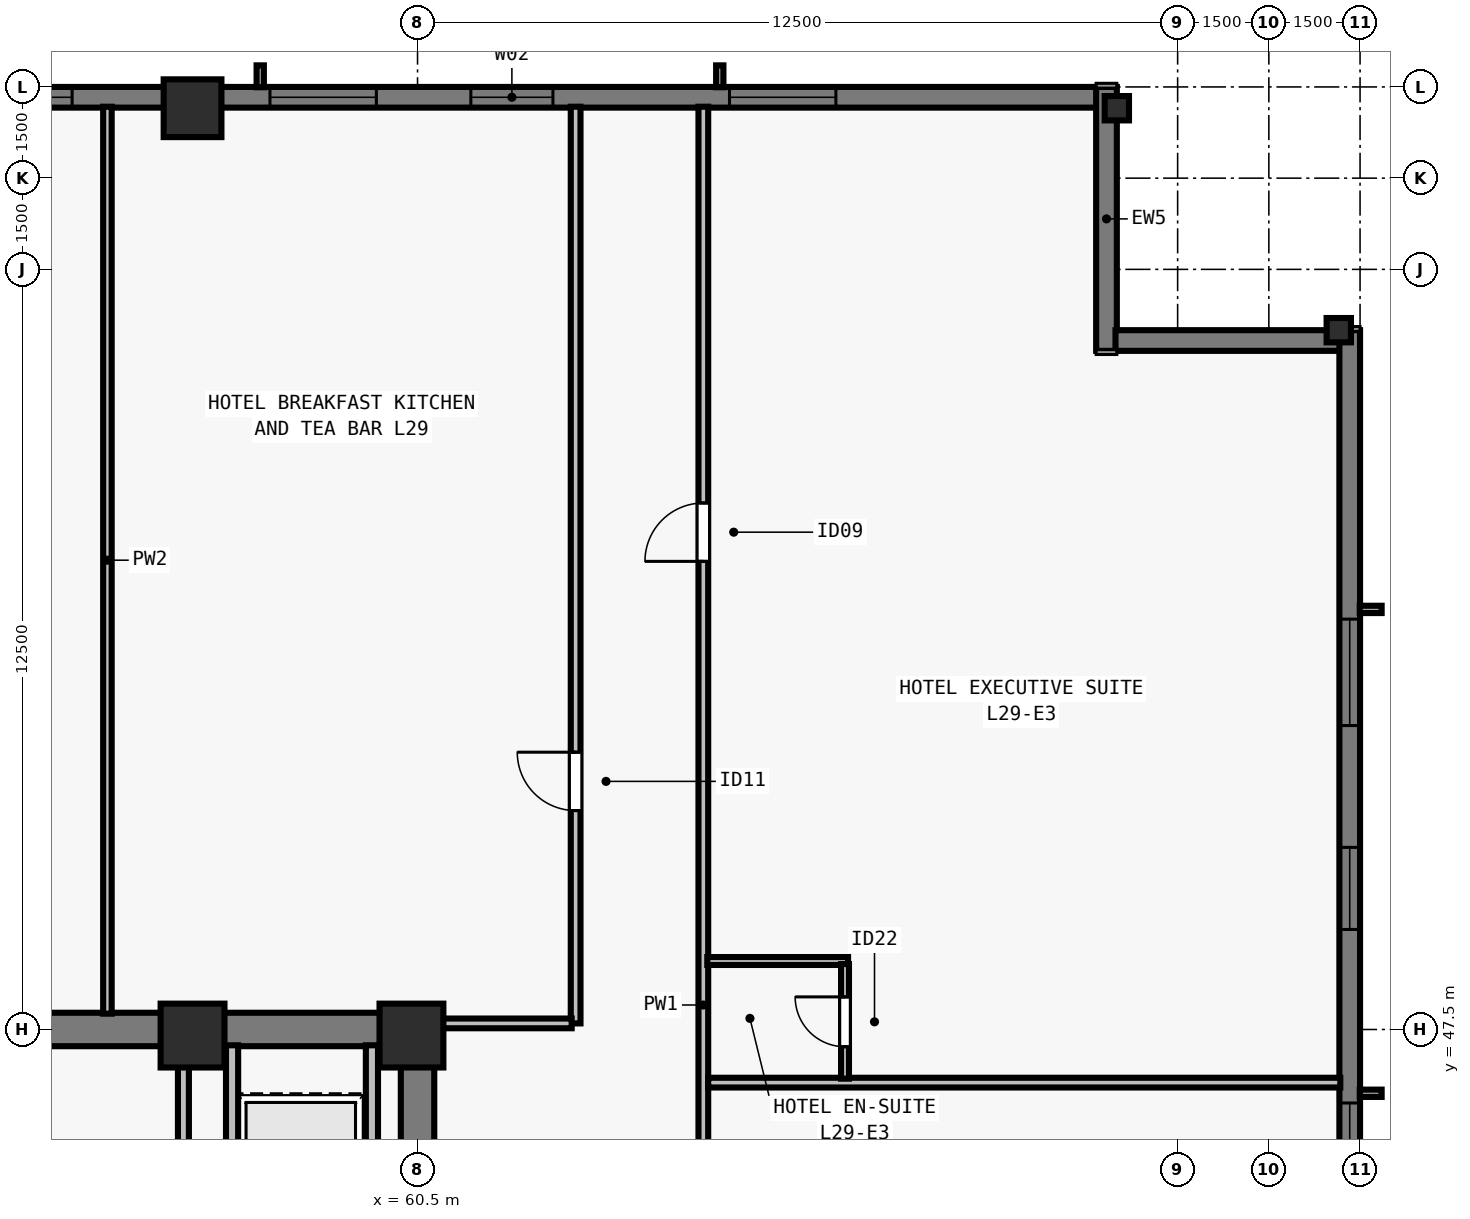
"""IFC4 building model, lengths in metres.
Left out: names, types, materials, properties, quantities, classifications, styles, units other than length and angle.
Written with IfcOpenShell. Run it as: python <this file> out.ifc"""

import sys

from ifc_helpers import new_model, si_unit, direction, frame, frame_2d, origin, origin_2d, place, context, subcontext, project, spatial, rectangle, i_section, extrude, element, fill, save


model = new_model("IFC4")
c1 = context("Model", 3, precision=1e-05, world=origin(), true_north=direction((0.0, 1.0)))
c2 = subcontext(c1, "Body", "Model", "MODEL_VIEW")
j1 = project(units=[si_unit("LENGTHUNIT", "METRE"), si_unit("PLANEANGLEUNIT", "RADIAN")], contexts=[c1])
p1 = place(None, origin())
s1 = spatial("IfcSite", under=j1, at=p1, CompositionType="ELEMENT")
p2 = place(p1, origin())
s2 = spatial("IfcBuilding", under=s1, at=p2, CompositionType="ELEMENT")
p3 = place(p2, frame((0.0, 0.0, 109.5)))
s3 = spatial("IfcBuildingStorey", under=s2, at=p3, CompositionType="ELEMENT", Elevation=109.5)
for number, where, z_axis, x_axis in (
    (1, (56.8, 47.4, 0.0), (0.0, 0.0, 1.0), (1.0, 0.0, 0.0)),
    (2, (60.4, 47.4, 0.0), (0.0, 0.0, 1.0), (1.0, 0.0, 0.0)),
):
    element("IfcColumn", number, at=place(p3, frame(where, z_axis=z_axis, x_axis=x_axis)), inside=s3, PredefinedType="COLUMN", context=c2, shape_type="SweptSolid", body=[
        extrude(rectangle(XDim=1.05, YDim=1.05, at=origin_2d()), origin(), (0.0, 0.0, 1.0), 3.5),
    ])
for number, where, z_axis, x_axis in (
    (3, (75.65, 59.0, 0.0), (0.0, 0.0, 1.0), (0.0, 1.0, 0.0)),
    (4, (72.0, 62.65, 0.0), (0.0, 0.0, 1.0), (1.0, 0.0, 0.0)),
):
    element("IfcColumn", number, at=place(p3, frame(where, z_axis=z_axis, x_axis=x_axis)), inside=s3, PredefinedType="COLUMN", context=c2, shape_type="SweptSolid", body=[
        extrude(i_section(OverallWidth=0.4, OverallDepth=0.4, WebThickness=0.022, FlangeThickness=0.036, at=origin_2d()), origin(), (0.0, 0.0, 1.0), 3.5),
    ])
p4 = place(p3, frame((56.8, 62.65, 0.0), z_axis=(0.0, 0.0, 1.0), x_axis=(1.0, 0.0, 0.0)))
e5 = element("IfcColumn", 5, at=p4, inside=s3, PredefinedType="COLUMN", context=c2, shape_type="SweptSolid", body=[
    extrude(rectangle(XDim=0.95, YDim=0.95, at=origin_2d()), origin(), (0.0, 0.0, 1.0), 3.5),
])
p5 = place(p3, frame((32.0, 62.83, 0.0), z_axis=(0.0, 0.0, 1.0), x_axis=(1.0, 0.0, 0.0)))
e6 = element("IfcWall", 6, at=p5, inside=s3, PredefinedType="SOLIDWALL", context=c2, shape_type="SweptSolid", body=[
    extrude(rectangle(XDim=39.682, YDim=0.34, at=frame_2d((19.841, 0.0))), origin(), (0.0, 0.0, 1.0), 3.28),
])
p6 = place(p5, frame((4.302, 0.0, 0.8)))
e7 = element("IfcOpeningElement", 7, at=p6, cuts=e6, PredefinedType="OPENING", context=c2, shape_type="SweptSolid", body=[
    extrude(rectangle(XDim=1.75, YDim=1.66, at=frame_2d((0.875, 0.83))), frame((0.0, 0.18, 0.0), z_axis=(0.0, -1.0, 0.0), x_axis=(1.0, 0.0, 0.0)), (0.0, 0.0, 1.0), 0.36),
])
p7 = place(p5, frame((9.355, 0.0, 0.8)))
e8 = element("IfcOpeningElement", 8, at=p7, cuts=e6, PredefinedType="OPENING", context=c2, shape_type="SweptSolid", body=[
    extrude(rectangle(XDim=1.35, YDim=1.66, at=frame_2d((0.675, 0.83))), frame((0.0, 0.18, 0.0), z_axis=(0.0, -1.0, 0.0), x_axis=(1.0, 0.0, 0.0)), (0.0, 0.0, 1.0), 0.36),
])
p8 = place(p5, frame((11.859, 0.0, 0.8)))
e9 = element("IfcOpeningElement", 9, at=p8, cuts=e6, PredefinedType="OPENING", context=c2, shape_type="SweptSolid", body=[
    extrude(rectangle(XDim=1.75, YDim=1.66, at=frame_2d((0.875, 0.83))), frame((0.0, 0.18, 0.0), z_axis=(0.0, -1.0, 0.0), x_axis=(1.0, 0.0, 0.0)), (0.0, 0.0, 1.0), 0.36),
])
p9 = place(p5, frame((18.966, 0.0, 0.8)))
e10 = element("IfcOpeningElement", 10, at=p9, cuts=e6, PredefinedType="OPENING", context=c2, shape_type="SweptSolid", body=[
    extrude(rectangle(XDim=1.75, YDim=1.66, at=frame_2d((0.875, 0.83))), frame((0.0, 0.18, 0.0), z_axis=(0.0, -1.0, 0.0), x_axis=(1.0, 0.0, 0.0)), (0.0, 0.0, 1.0), 0.36),
])
p10 = place(p5, frame((21.469, 0.0, 0.8)))
e11 = element("IfcOpeningElement", 11, at=p10, cuts=e6, PredefinedType="OPENING", context=c2, shape_type="SweptSolid", body=[
    extrude(rectangle(XDim=1.35, YDim=1.66, at=frame_2d((0.675, 0.83))), frame((0.0, 0.18, 0.0), z_axis=(0.0, -1.0, 0.0), x_axis=(1.0, 0.0, 0.0)), (0.0, 0.0, 1.0), 0.36),
])
p11 = place(p5, frame((26.073, 0.0, 0.8)))
e12 = element("IfcOpeningElement", 12, at=p11, cuts=e6, PredefinedType="OPENING", context=c2, shape_type="SweptSolid", body=[
    extrude(rectangle(XDim=1.75, YDim=1.66, at=frame_2d((0.875, 0.83))), frame((0.0, 0.18, 0.0), z_axis=(0.0, -1.0, 0.0), x_axis=(1.0, 0.0, 0.0)), (0.0, 0.0, 1.0), 0.36),
])
p12 = place(p5, frame((29.377, 0.0, 0.8)))
e13 = element("IfcOpeningElement", 13, at=p12, cuts=e6, PredefinedType="OPENING", context=c2, shape_type="SweptSolid", body=[
    extrude(rectangle(XDim=1.35, YDim=1.66, at=frame_2d((0.675, 0.83))), frame((0.0, 0.18, 0.0), z_axis=(0.0, -1.0, 0.0), x_axis=(1.0, 0.0, 0.0)), (0.0, 0.0, 1.0), 0.36),
])
p13 = place(p5, frame((33.63, 0.0, 0.8)))
e14 = element("IfcOpeningElement", 14, at=p13, cuts=e6, PredefinedType="OPENING", context=c2, shape_type="SweptSolid", body=[
    extrude(rectangle(XDim=1.75, YDim=1.66, at=frame_2d((0.875, 0.83))), frame((0.0, 0.18, 0.0), z_axis=(0.0, -1.0, 0.0), x_axis=(1.0, 0.0, 0.0)), (0.0, 0.0, 1.0), 0.36),
])
p14 = place(p3, frame((71.83, 63.0, 0.0), z_axis=(0.0, 0.0, 1.0), x_axis=(0.0, -1.0, 0.0)))
e15 = element("IfcWall", 15, at=p14, inside=s3, PredefinedType="SOLIDWALL", context=c2, shape_type="SweptSolid", body=[
    extrude(rectangle(XDim=4.34, YDim=0.34, at=frame_2d((2.17, 0.0))), origin(), (0.0, 0.0, 1.0), 3.28),
])
p15 = place(p3, frame((71.978, 58.83, 0.0), z_axis=(0.0, 0.0, 1.0), x_axis=(1.0, 0.0, 0.0)))
e16 = element("IfcWall", 16, at=p15, inside=s3, PredefinedType="SOLIDWALL", context=c2, shape_type="SweptSolid", body=[
    extrude(rectangle(XDim=3.704, YDim=0.34, at=frame_2d((1.852, 0.0))), origin(), (0.0, 0.0, 1.0), 3.28),
])
p16 = place(p3, frame((75.83, 59.0, 0.0), z_axis=(0.0, 0.0, 1.0), x_axis=(0.0, -1.0, 0.0)))
e17 = element("IfcWall", 17, at=p16, inside=s3, PredefinedType="SOLIDWALL", context=c2, shape_type="SweptSolid", body=[
    extrude(rectangle(XDim=39.682, YDim=0.34, at=frame_2d((19.841, 0.0))), origin(), (0.0, 0.0, 1.0), 3.28),
])
p17 = place(p16, frame((4.752, 0.0, 0.8)))
e18 = element("IfcOpeningElement", 18, at=p17, cuts=e17, PredefinedType="OPENING", context=c2, shape_type="SweptSolid", body=[
    extrude(rectangle(XDim=1.75, YDim=1.66, at=frame_2d((0.875, 0.83))), frame((0.0, 0.18, 0.0), z_axis=(0.0, -1.0, 0.0), x_axis=(1.0, 0.0, 0.0)), (0.0, 0.0, 1.0), 0.36),
])
p18 = place(p16, frame((8.505, 0.0, 0.8)))
e19 = element("IfcOpeningElement", 19, at=p18, cuts=e17, PredefinedType="OPENING", context=c2, shape_type="SweptSolid", body=[
    extrude(rectangle(XDim=1.35, YDim=1.66, at=frame_2d((0.675, 0.83))), frame((0.0, 0.18, 0.0), z_axis=(0.0, -1.0, 0.0), x_axis=(1.0, 0.0, 0.0)), (0.0, 0.0, 1.0), 0.36),
])
p19 = place(p16, frame((12.709, 0.0, 0.8)))
e20 = element("IfcOpeningElement", 20, at=p19, cuts=e17, PredefinedType="OPENING", context=c2, shape_type="SweptSolid", body=[
    extrude(rectangle(XDim=1.75, YDim=1.66, at=frame_2d((0.875, 0.83))), frame((0.0, 0.18, 0.0), z_axis=(0.0, -1.0, 0.0), x_axis=(1.0, 0.0, 0.0)), (0.0, 0.0, 1.0), 0.36),
])
p20 = place(p16, frame((16.062, 0.0, 0.8)))
e21 = element("IfcOpeningElement", 21, at=p20, cuts=e17, PredefinedType="OPENING", context=c2, shape_type="SweptSolid", body=[
    extrude(rectangle(XDim=1.35, YDim=1.66, at=frame_2d((0.675, 0.83))), frame((0.0, 0.18, 0.0), z_axis=(0.0, -1.0, 0.0), x_axis=(1.0, 0.0, 0.0)), (0.0, 0.0, 1.0), 0.36),
])
p21 = place(p16, frame((18.966, 0.0, 0.8)))
e22 = element("IfcOpeningElement", 22, at=p21, cuts=e17, PredefinedType="OPENING", context=c2, shape_type="SweptSolid", body=[
    extrude(rectangle(XDim=1.75, YDim=1.66, at=frame_2d((0.875, 0.83))), frame((0.0, 0.18, 0.0), z_axis=(0.0, -1.0, 0.0), x_axis=(1.0, 0.0, 0.0)), (0.0, 0.0, 1.0), 0.36),
])
p22 = place(p16, frame((22.719, 0.0, 0.8)))
e23 = element("IfcOpeningElement", 23, at=p22, cuts=e17, PredefinedType="OPENING", context=c2, shape_type="SweptSolid", body=[
    extrude(rectangle(XDim=1.35, YDim=1.66, at=frame_2d((0.675, 0.83))), frame((0.0, 0.18, 0.0), z_axis=(0.0, -1.0, 0.0), x_axis=(1.0, 0.0, 0.0)), (0.0, 0.0, 1.0), 0.36),
])
p23 = place(p16, frame((29.827, 0.0, 0.8)))
e24 = element("IfcOpeningElement", 24, at=p23, cuts=e17, PredefinedType="OPENING", context=c2, shape_type="SweptSolid", body=[
    extrude(rectangle(XDim=1.35, YDim=1.66, at=frame_2d((0.675, 0.83))), frame((0.0, 0.18, 0.0), z_axis=(0.0, -1.0, 0.0), x_axis=(1.0, 0.0, 0.0)), (0.0, 0.0, 1.0), 0.36),
])
p24 = place(p16, frame((33.18, 0.0, 0.8)))
e25 = element("IfcOpeningElement", 25, at=p24, cuts=e17, PredefinedType="OPENING", context=c2, shape_type="SweptSolid", body=[
    extrude(rectangle(XDim=1.75, YDim=1.66, at=frame_2d((0.875, 0.83))), frame((0.0, 0.18, 0.0), z_axis=(0.0, -1.0, 0.0), x_axis=(1.0, 0.0, 0.0)), (0.0, 0.0, 1.0), 0.36),
])
p25 = place(p3, frame((43.225, 47.5, 0.0), z_axis=(0.0, 0.0, 1.0), x_axis=(1.0, 0.0, 0.0)))
e26 = element("IfcWall", 26, at=p25, inside=s3, PredefinedType="SHEAR", context=c2, shape_type="SweptSolid", body=[
    extrude(rectangle(XDim=17.55, YDim=0.55, at=frame_2d((8.775, 0.0))), origin(), (0.0, 0.0, 1.0), 3.28),
])
p26 = place(p3, frame((60.5, 40.8, 0.0), z_axis=(0.0, 0.0, 1.0), x_axis=(0.0, 1.0, 0.0)))
e27 = element("IfcWall", 27, at=p26, inside=s3, PredefinedType="SHEAR", context=c2, shape_type="SweptSolid", body=[
    extrude(rectangle(XDim=6.435, YDim=0.55, at=frame_2d((3.218, 0.0))), origin(), (0.0, 0.0, 1.0), 3.28),
])
for number, where, z_axis, x_axis in (
    (28, (57.45, 43.735, 0.0), (0.0, 0.0, 1.0), (0.0, 1.0, 0.0)),
    (29, (59.75, 43.735, 0.0), (0.0, 0.0, 1.0), (0.0, 1.0, 0.0)),
):
    element("IfcWall", number, at=place(p3, frame(where, z_axis=z_axis, x_axis=x_axis)), inside=s3, PredefinedType="SOLIDWALL", context=c2, shape_type="SweptSolid", body=[
        extrude(rectangle(XDim=3.505, YDim=0.2, at=frame_2d((1.752, 0.0))), origin(), (0.0, 0.0, 1.0), 3.28),
    ])
p27 = place(p3, frame((56.65, 43.735, 0.0), z_axis=(0.0, 0.0, 1.0), x_axis=(0.0, 1.0, 0.0)))
e30 = element("IfcWall", 30, at=p27, inside=s3, PredefinedType="SOLIDWALL", context=c2, shape_type="SweptSolid", body=[
    extrude(rectangle(XDim=3.505, YDim=0.18, at=frame_2d((1.752, 0.0))), origin(), (0.0, 0.0, 1.0), 3.28),
])
p28 = place(p3, frame((65.2, 15.325, 0.0), z_axis=(0.0, 0.0, 1.0), x_axis=(0.0, 1.0, 0.0)))
e31 = element("IfcWall", 31, at=p28, inside=s3, PredefinedType="PARTITIONING", context=c2, shape_type="SweptSolid", body=[
    extrude(rectangle(XDim=47.35, YDim=0.16, at=frame_2d((23.675, 0.0))), origin(), (0.0, 0.0, 1.0), 2.555),
])
p29 = place(p28, frame((8.944, 0.0, 0.0)))
e32 = element("IfcOpeningElement", 32, at=p29, cuts=e31, PredefinedType="OPENING", context=c2, shape_type="SweptSolid", body=[
    extrude(rectangle(XDim=0.96, YDim=2.15, at=frame_2d((0.48, 1.075))), frame((0.0, 0.09, 0.0), z_axis=(0.0, -1.0, 0.0), x_axis=(1.0, 0.0, 0.0)), (0.0, 0.0, 1.0), 0.18),
])
p30 = place(p28, frame((24.322, 0.0, 0.0)))
e33 = element("IfcOpeningElement", 33, at=p30, cuts=e31, PredefinedType="OPENING", context=c2, shape_type="SweptSolid", body=[
    extrude(rectangle(XDim=0.96, YDim=2.15, at=frame_2d((0.48, 1.075))), frame((0.0, 0.09, 0.0), z_axis=(0.0, -1.0, 0.0), x_axis=(1.0, 0.0, 0.0)), (0.0, 0.0, 1.0), 0.18),
])
p31 = place(p28, frame((39.873, 0.0, 0.0)))
e34 = element("IfcOpeningElement", 34, at=p31, cuts=e31, PredefinedType="OPENING", context=c2, shape_type="SweptSolid", body=[
    extrude(rectangle(XDim=0.96, YDim=2.15, at=frame_2d((0.48, 1.075))), frame((0.0, 0.09, 0.0), z_axis=(0.0, -1.0, 0.0), x_axis=(1.0, 0.0, 0.0)), (0.0, 0.0, 1.0), 0.18),
])
p32 = place(p3, frame((63.1, 47.6, 0.0), z_axis=(0.0, 0.0, 1.0), x_axis=(0.0, 1.0, 0.0)))
e35 = element("IfcWall", 35, at=p32, inside=s3, PredefinedType="PARTITIONING", context=c2, shape_type="SweptSolid", body=[
    extrude(rectangle(XDim=15.075, YDim=0.16, at=frame_2d((7.538, 0.0))), origin(), (0.0, 0.0, 1.0), 2.555),
])
p33 = place(p32, frame((3.5, 0.0, 0.0)))
e36 = element("IfcOpeningElement", 36, at=p33, cuts=e35, PredefinedType="OPENING", context=c2, shape_type="SweptSolid", body=[
    extrude(rectangle(XDim=0.96, YDim=2.12, at=frame_2d((0.48, 1.06))), frame((0.0, 0.09, 0.0), z_axis=(0.0, -1.0, 0.0), x_axis=(1.0, 0.0, 0.0)), (0.0, 0.0, 1.0), 0.18),
])
p34 = place(p3, frame((60.765, 47.6, 0.0), z_axis=(0.0, 0.0, 1.0), x_axis=(1.0, 0.0, 0.0)))
e37 = element("IfcWall", 37, at=p34, inside=s3, PredefinedType="PARTITIONING", context=c2, shape_type="SweptSolid", body=[
    extrude(rectangle(XDim=2.27, YDim=0.16, at=frame_2d((1.135, 0.0))), origin(), (0.0, 0.0, 1.0), 3.28),
])
p35 = place(p3, frame((55.4, 47.76, 0.0), z_axis=(0.0, 0.0, 1.0), x_axis=(0.0, 1.0, 0.0)))
e38 = element("IfcWall", 38, at=p35, inside=s3, PredefinedType="PARTITIONING", context=c2, shape_type="SweptSolid", body=[
    extrude(rectangle(XDim=14.915, YDim=0.14, at=frame_2d((7.458, 0.0))), origin(), (0.0, 0.0, 1.0), 2.896),
])
p36 = place(p3, frame((65.28, 46.626, 0.0), z_axis=(0.0, 0.0, 1.0), x_axis=(1.0, 0.0, 0.0)))
e39 = element("IfcWall", 39, at=p36, inside=s3, PredefinedType="PARTITIONING", context=c2, shape_type="SweptSolid", body=[
    extrude(rectangle(XDim=10.395, YDim=0.16, at=frame_2d((5.198, 0.0))), origin(), (0.0, 0.0, 1.0), 3.28),
])
p37 = place(p3, frame((65.265, 48.626, 0.0), z_axis=(0.0, 0.0, 1.0), x_axis=(1.0, 0.0, 0.0)))
e40 = element("IfcWall", 40, at=p37, inside=s3, PredefinedType="PLUMBINGWALL", context=c2, shape_type="SweptSolid", body=[
    extrude(rectangle(XDim=2.315, YDim=0.13, at=frame_2d((1.158, 0.0))), origin(), (0.0, 0.0, 1.0), 3.28),
])
p38 = place(p3, frame((67.53, 46.691, 0.0), z_axis=(0.0, 0.0, 1.0), x_axis=(0.0, 1.0, 0.0)))
e41 = element("IfcWall", 41, at=p38, inside=s3, PredefinedType="PLUMBINGWALL", context=c2, shape_type="SweptSolid", body=[
    extrude(rectangle(XDim=1.885, YDim=0.13, at=frame_2d((0.942, 0.0))), origin(), (0.0, 0.0, 1.0), 3.28),
])
p39 = place(p38, frame((0.525, 0.0, 0.0)))
e42 = element("IfcOpeningElement", 42, at=p39, cuts=e41, PredefinedType="OPENING", context=c2, shape_type="SweptSolid", body=[
    extrude(rectangle(XDim=0.82, YDim=2.1, at=frame_2d((0.41, 1.05))), frame((0.0, 0.075, 0.0), z_axis=(0.0, -1.0, 0.0), x_axis=(1.0, 0.0, 0.0)), (0.0, 0.0, 1.0), 0.15),
])
p40 = place(p10, origin())
e43 = element("IfcWindow", 43, at=p40, inside=s3, PartitioningType="SINGLE_PANEL", PredefinedType="WINDOW", context=c2, shape_type="SweptSolid", body=[
    extrude(rectangle(XDim=1.35, YDim=1.66, at=frame_2d((0.675, 0.83))), frame((0.0, -0.05, 0.0), z_axis=(0.0, -1.0, 0.0), x_axis=(1.0, 0.0, 0.0)), (0.0, 0.0, 1.0), 0.06),
])
fill(e11, e43)
p41 = place(p11, origin())
e44 = element("IfcWindow", 44, at=p41, inside=s3, PartitioningType="SINGLE_PANEL", PredefinedType="WINDOW", context=c2, shape_type="SweptSolid", body=[
    extrude(rectangle(XDim=1.75, YDim=1.66, at=frame_2d((0.875, 0.83))), frame((0.0, -0.05, 0.0), z_axis=(0.0, -1.0, 0.0), x_axis=(1.0, 0.0, 0.0)), (0.0, 0.0, 1.0), 0.06),
])
fill(e12, e44)
p42 = place(p12, origin())
e45 = element("IfcWindow", 45, at=p42, inside=s3, PartitioningType="SINGLE_PANEL", PredefinedType="WINDOW", context=c2, shape_type="SweptSolid", body=[
    extrude(rectangle(XDim=1.35, YDim=1.66, at=frame_2d((0.675, 0.83))), frame((0.0, -0.05, 0.0), z_axis=(0.0, -1.0, 0.0), x_axis=(1.0, 0.0, 0.0)), (0.0, 0.0, 1.0), 0.06),
])
fill(e13, e45)
p43 = place(p13, origin())
e46 = element("IfcWindow", 46, at=p43, inside=s3, PartitioningType="SINGLE_PANEL", PredefinedType="WINDOW", context=c2, shape_type="SweptSolid", body=[
    extrude(rectangle(XDim=1.75, YDim=1.66, at=frame_2d((0.875, 0.83))), frame((0.0, -0.05, 0.0), z_axis=(0.0, -1.0, 0.0), x_axis=(1.0, 0.0, 0.0)), (0.0, 0.0, 1.0), 0.06),
])
fill(e14, e46)
p44 = place(p17, origin())
e47 = element("IfcWindow", 47, at=p44, inside=s3, PartitioningType="SINGLE_PANEL", PredefinedType="WINDOW", context=c2, shape_type="SweptSolid", body=[
    extrude(rectangle(XDim=1.75, YDim=1.66, at=frame_2d((0.875, 0.83))), frame((0.0, -0.05, 0.0), z_axis=(0.0, -1.0, 0.0), x_axis=(1.0, 0.0, 0.0)), (0.0, 0.0, 1.0), 0.06),
])
fill(e18, e47)
p45 = place(p18, origin())
e48 = element("IfcWindow", 48, at=p45, inside=s3, PartitioningType="SINGLE_PANEL", PredefinedType="WINDOW", context=c2, shape_type="SweptSolid", body=[
    extrude(rectangle(XDim=1.35, YDim=1.66, at=frame_2d((0.675, 0.83))), frame((0.0, -0.05, 0.0), z_axis=(0.0, -1.0, 0.0), x_axis=(1.0, 0.0, 0.0)), (0.0, 0.0, 1.0), 0.06),
])
fill(e19, e48)
p46 = place(p19, origin())
e49 = element("IfcWindow", 49, at=p46, inside=s3, PartitioningType="SINGLE_PANEL", PredefinedType="WINDOW", context=c2, shape_type="SweptSolid", body=[
    extrude(rectangle(XDim=1.75, YDim=1.66, at=frame_2d((0.875, 0.83))), frame((0.0, -0.05, 0.0), z_axis=(0.0, -1.0, 0.0), x_axis=(1.0, 0.0, 0.0)), (0.0, 0.0, 1.0), 0.06),
])
fill(e20, e49)
p47 = place(p33, origin())
e50 = element("IfcDoor", 50, at=p47, inside=s3, OperationType="SINGLE_SWING_RIGHT", PredefinedType="DOOR", context=c2, shape_type="SweptSolid", body=[
    extrude(rectangle(XDim=0.96, YDim=2.12, at=frame_2d((0.48, 1.06))), frame((0.0, 0.025, 0.0), z_axis=(0.0, -1.0, 0.0), x_axis=(1.0, 0.0, 0.0)), (0.0, 0.0, 1.0), 0.05),
])
fill(e36, e50)
p48 = place(p39, origin())
e51 = element("IfcDoor", 51, at=p48, inside=s3, OperationType="SINGLE_SWING_RIGHT", PredefinedType="DOOR", context=c2, shape_type="SweptSolid", body=[
    extrude(rectangle(XDim=0.82, YDim=2.1, at=frame_2d((0.41, 1.05))), frame((0.0, 0.025, 0.0), z_axis=(0.0, -1.0, 0.0), x_axis=(1.0, 0.0, 0.0)), (0.0, 0.0, 1.0), 0.05),
])
fill(e42, e51)
p49 = place(p31, origin())
e52 = element("IfcDoor", 52, at=p49, inside=s3, OperationType="SINGLE_SWING_LEFT", PredefinedType="DOOR", context=c2, shape_type="SweptSolid", body=[
    extrude(rectangle(XDim=0.96, YDim=2.15, at=frame_2d((0.48, 1.075))), frame((0.0, 0.025, 0.0), z_axis=(0.0, -1.0, 0.0), x_axis=(1.0, 0.0, 0.0)), (0.0, 0.0, 1.0), 0.05),
])
fill(e34, e52)
save(model, sys.argv[1])
